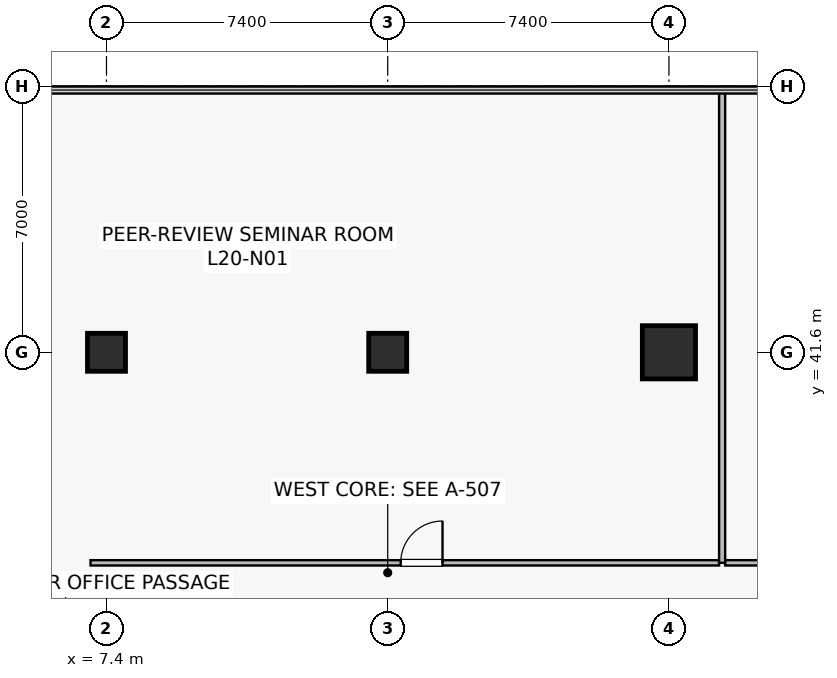
"""IFC4 building model, lengths in metres.
Left out: names, types, materials, properties, quantities, classifications, styles, units other than length and angle.
Written with IfcOpenShell. Run it as: python <this file> out.ifc"""

import sys

from ifc_helpers import new_model, si_unit, direction, frame, frame_2d, origin, origin_2d, place, context, subcontext, project, spatial, rectangle, extrude, source, transform, mapped, element, fill, save


model = new_model("IFC4")
c1 = context("Model", 3, precision=1e-05, world=origin(), true_north=direction((0.0, 1.0)))
c2 = subcontext(c1, "Body", "Model", "MODEL_VIEW")
j1 = project(units=[si_unit("LENGTHUNIT", "METRE"), si_unit("PLANEANGLEUNIT", "RADIAN")], contexts=[c1])
p1 = place(None, origin())
s1 = spatial("IfcSite", under=j1, at=p1, CompositionType="ELEMENT")
p2 = place(p1, origin())
s2 = spatial("IfcBuilding", under=s1, at=p2, CompositionType="ELEMENT")
p3 = place(p2, frame((0.0, 0.0, 82.6)))
s3 = spatial("IfcBuildingStorey", under=s2, at=p3, CompositionType="ELEMENT", Elevation=82.6)
m1 = source(origin(), c2, "Body", "SweptSolid", [
    extrude(rectangle(XDim=1.0, YDim=1.0, at=origin_2d()), origin(), (0.0, 0.0, 1.0), 4.1),
])
p4 = place(p3, frame((14.8, 41.6, 0.0), z_axis=(0.0, 0.0, 1.0), x_axis=(1.0, 0.0, 0.0)))
e1 = element("IfcColumn", 1, at=p4, inside=s3, PredefinedType="COLUMN", context=c2, shape_type="MappedRepresentation", body=[
    mapped(m1, transform((0.0, 0.0, 0.0), scale=1.0)),
])
m2 = source(origin(), c2, "Body", "SweptSolid", [
    extrude(rectangle(XDim=1.4, YDim=1.4, at=origin_2d()), origin(), (0.0, 0.0, 1.0), 4.1),
])
p5 = place(p3, frame((22.2, 41.6, 0.0), z_axis=(0.0, 0.0, 1.0), x_axis=(1.0, 0.0, 0.0)))
e2 = element("IfcColumn", 2, at=p5, inside=s3, PredefinedType="COLUMN", context=c2, shape_type="MappedRepresentation", body=[
    mapped(m2, transform((0.0, 0.0, 0.0), scale=1.0)),
])
p6 = place(p3, frame((7.4, 41.6, 0.0), z_axis=(0.0, 0.0, 1.0), x_axis=(1.0, 0.0, 0.0)))
e3 = element("IfcColumn", 3, at=p6, inside=s3, PredefinedType="COLUMN", context=c2, shape_type="MappedRepresentation", body=[
    mapped(m1, transform((0.0, 0.0, 0.0), scale=1.0)),
])
p7 = place(p3, frame((6.98, 36.06, 0.0), z_axis=(0.0, 0.0, 1.0), x_axis=(1.0, 0.0, 0.0)))
e4 = element("IfcWall", 4, at=p7, inside=s3, PredefinedType="PARTITIONING", context=c2, shape_type="SweptSolid", body=[
    extrude(rectangle(XDim=16.54, YDim=0.14, at=frame_2d((8.27, 0.0))), origin(), (0.0, 0.0, 1.0), 3.115),
])
p8 = place(p7, frame((8.162, 0.0, 0.0)))
e5 = element("IfcOpeningElement", 5, at=p8, cuts=e4, PredefinedType="OPENING", context=c2, shape_type="SweptSolid", body=[
    extrude(rectangle(XDim=1.1, YDim=2.18, at=frame_2d((0.55, 1.09))), frame((0.0, 0.08, 0.0), z_axis=(0.0, -1.0, 0.0), x_axis=(1.0, 0.0, 0.0)), (0.0, 0.0, 1.0), 0.16),
])
p9 = place(p3, frame((23.6, 36.06, 0.0), z_axis=(0.0, 0.0, 1.0), x_axis=(0.0, 1.0, 0.0)))
e6 = element("IfcWall", 6, at=p9, inside=s3, PredefinedType="PARTITIONING", context=c2, shape_type="SweptSolid", body=[
    extrude(rectangle(XDim=12.43, YDim=0.16, at=frame_2d((6.215, 0.0))), origin(), (0.0, 0.0, 1.0), 3.015),
])
p10 = place(p3, frame((23.68, 36.06, 0.0), z_axis=(0.0, 0.0, 1.0), x_axis=(1.0, 0.0, 0.0)))
e7 = element("IfcWall", 7, at=p10, inside=s3, PredefinedType="PARTITIONING", context=c2, shape_type="SweptSolid", body=[
    extrude(rectangle(XDim=23.64, YDim=0.14, at=frame_2d((11.82, 0.0))), origin(), (0.0, 0.0, 1.0), 3.115),
])
p11 = place(p10, frame((9.304, 0.0, 0.0)))
e8 = element("IfcOpeningElement", 8, at=p11, cuts=e7, PredefinedType="OPENING", context=c2, shape_type="SweptSolid", body=[
    extrude(rectangle(XDim=1.1, YDim=2.18, at=frame_2d((0.55, 1.09))), frame((0.0, 0.08, 0.0), z_axis=(0.0, -1.0, 0.0), x_axis=(1.0, 0.0, 0.0)), (0.0, 0.0, 1.0), 0.16),
])
m3 = source(origin(), c2, "Body", "SweptSolid", [
    extrude(rectangle(XDim=1.1, YDim=2.18, at=frame_2d((0.55, 1.09))), frame((0.0, 0.025, 0.0), z_axis=(0.0, -1.0, 0.0), x_axis=(1.0, 0.0, 0.0)), (0.0, 0.0, 1.0), 0.05),
])
p12 = place(p8, origin())
e9 = element("IfcDoor", 9, at=p12, inside=s3, OperationType="SINGLE_SWING_RIGHT", PredefinedType="DOOR", context=c2, shape_type="MappedRepresentation", body=[
    mapped(m3, transform((0.0, 0.0, 0.0), scale=1.0)),
])
fill(e5, e9)
save(model, sys.argv[1])
